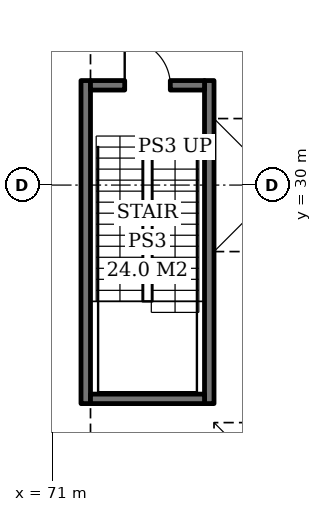
"""IFC4 building model, lengths in metres.
Left out: names, types, materials, properties, quantities, classifications, styles, units other than length and angle.
Written with IfcOpenShell. Run it as: python <this file> out.ifc"""

import sys

from ifc_helpers import new_model, si_unit, direction, frame, frame_2d, origin, place, context, subcontext, project, spatial, rectangle, extrude, element, fill, save


model = new_model("IFC4")
c1 = context("Model", 3, precision=1e-05, world=origin(), true_north=direction((0.0, 1.0)))
c2 = subcontext(c1, "Body", "Model", "MODEL_VIEW")
j1 = project(units=[si_unit("LENGTHUNIT", "METRE"), si_unit("PLANEANGLEUNIT", "RADIAN")], contexts=[c1])
p1 = place(None, origin())
s1 = spatial("IfcSite", under=j1, at=p1, CompositionType="ELEMENT")
p2 = place(p1, origin())
s2 = spatial("IfcBuilding", under=s1, at=p2, CompositionType="ELEMENT")
p3 = place(p2, frame((0.0, 0.0, -10.0)))
s3 = spatial("IfcBuildingStorey", under=s2, at=p3, CompositionType="ELEMENT", Elevation=-10.0)
for number, where, z_axis, x_axis in (
    (1, (71.875, 24.25, 0.0), (0.0, 0.0, 1.0), (0.0, 1.0, 0.0)),
    (2, (75.125, 24.25, 0.0), (0.0, 0.0, 1.0), (0.0, 1.0, 0.0)),
):
    element("IfcWall", number, at=place(p3, frame(where, z_axis=z_axis, x_axis=x_axis)), inside=s3, PredefinedType="SOLIDWALL", context=c2, shape_type="SweptSolid", body=[
        extrude(rectangle(XDim=8.5, YDim=0.25, at=frame_2d((4.25, 0.0))), origin(), (0.0, 0.0, 1.0), 4.7),
    ])
p4 = place(p3, frame((72.0, 24.375, 0.0), z_axis=(0.0, 0.0, 1.0), x_axis=(1.0, 0.0, 0.0)))
e3 = element("IfcWall", 3, at=p4, inside=s3, PredefinedType="SOLIDWALL", context=c2, shape_type="SweptSolid", body=[
    extrude(rectangle(XDim=3.0, YDim=0.25, at=frame_2d((1.5, 0.0))), origin(), (0.0, 0.0, 1.0), 4.7),
])
p5 = place(p3, frame((72.0, 32.625, 0.0), z_axis=(0.0, 0.0, 1.0), x_axis=(1.0, 0.0, 0.0)))
e4 = element("IfcWall", 4, at=p5, inside=s3, PredefinedType="SOLIDWALL", context=c2, shape_type="SweptSolid", body=[
    extrude(rectangle(XDim=3.0, YDim=0.25, at=frame_2d((1.5, 0.0))), origin(), (0.0, 0.0, 1.0), 4.7),
])
p6 = place(p5, frame((0.9, 0.0, 0.0)))
e5 = element("IfcOpeningElement", 5, at=p6, cuts=e4, PredefinedType="OPENING", context=c2, shape_type="SweptSolid", body=[
    extrude(rectangle(XDim=1.2, YDim=2.1, at=frame_2d((0.6, 1.05))), frame((0.0, 0.135, 0.0), z_axis=(0.0, -1.0, 0.0), x_axis=(1.0, 0.0, 0.0)), (0.0, 0.0, 1.0), 0.27),
])
p7 = place(p6, origin())
e6 = element("IfcDoor", 6, at=p7, inside=s3, OperationType="SINGLE_SWING_LEFT", PredefinedType="DOOR", context=c2, shape_type="SweptSolid", body=[
    extrude(rectangle(XDim=1.2, YDim=2.1, at=frame_2d((0.6, 1.05))), frame((0.0, 0.025, 0.0), z_axis=(0.0, -1.0, 0.0), x_axis=(1.0, 0.0, 0.0)), (0.0, 0.0, 1.0), 0.05),
])
fill(e5, e6)
save(model, sys.argv[1])
